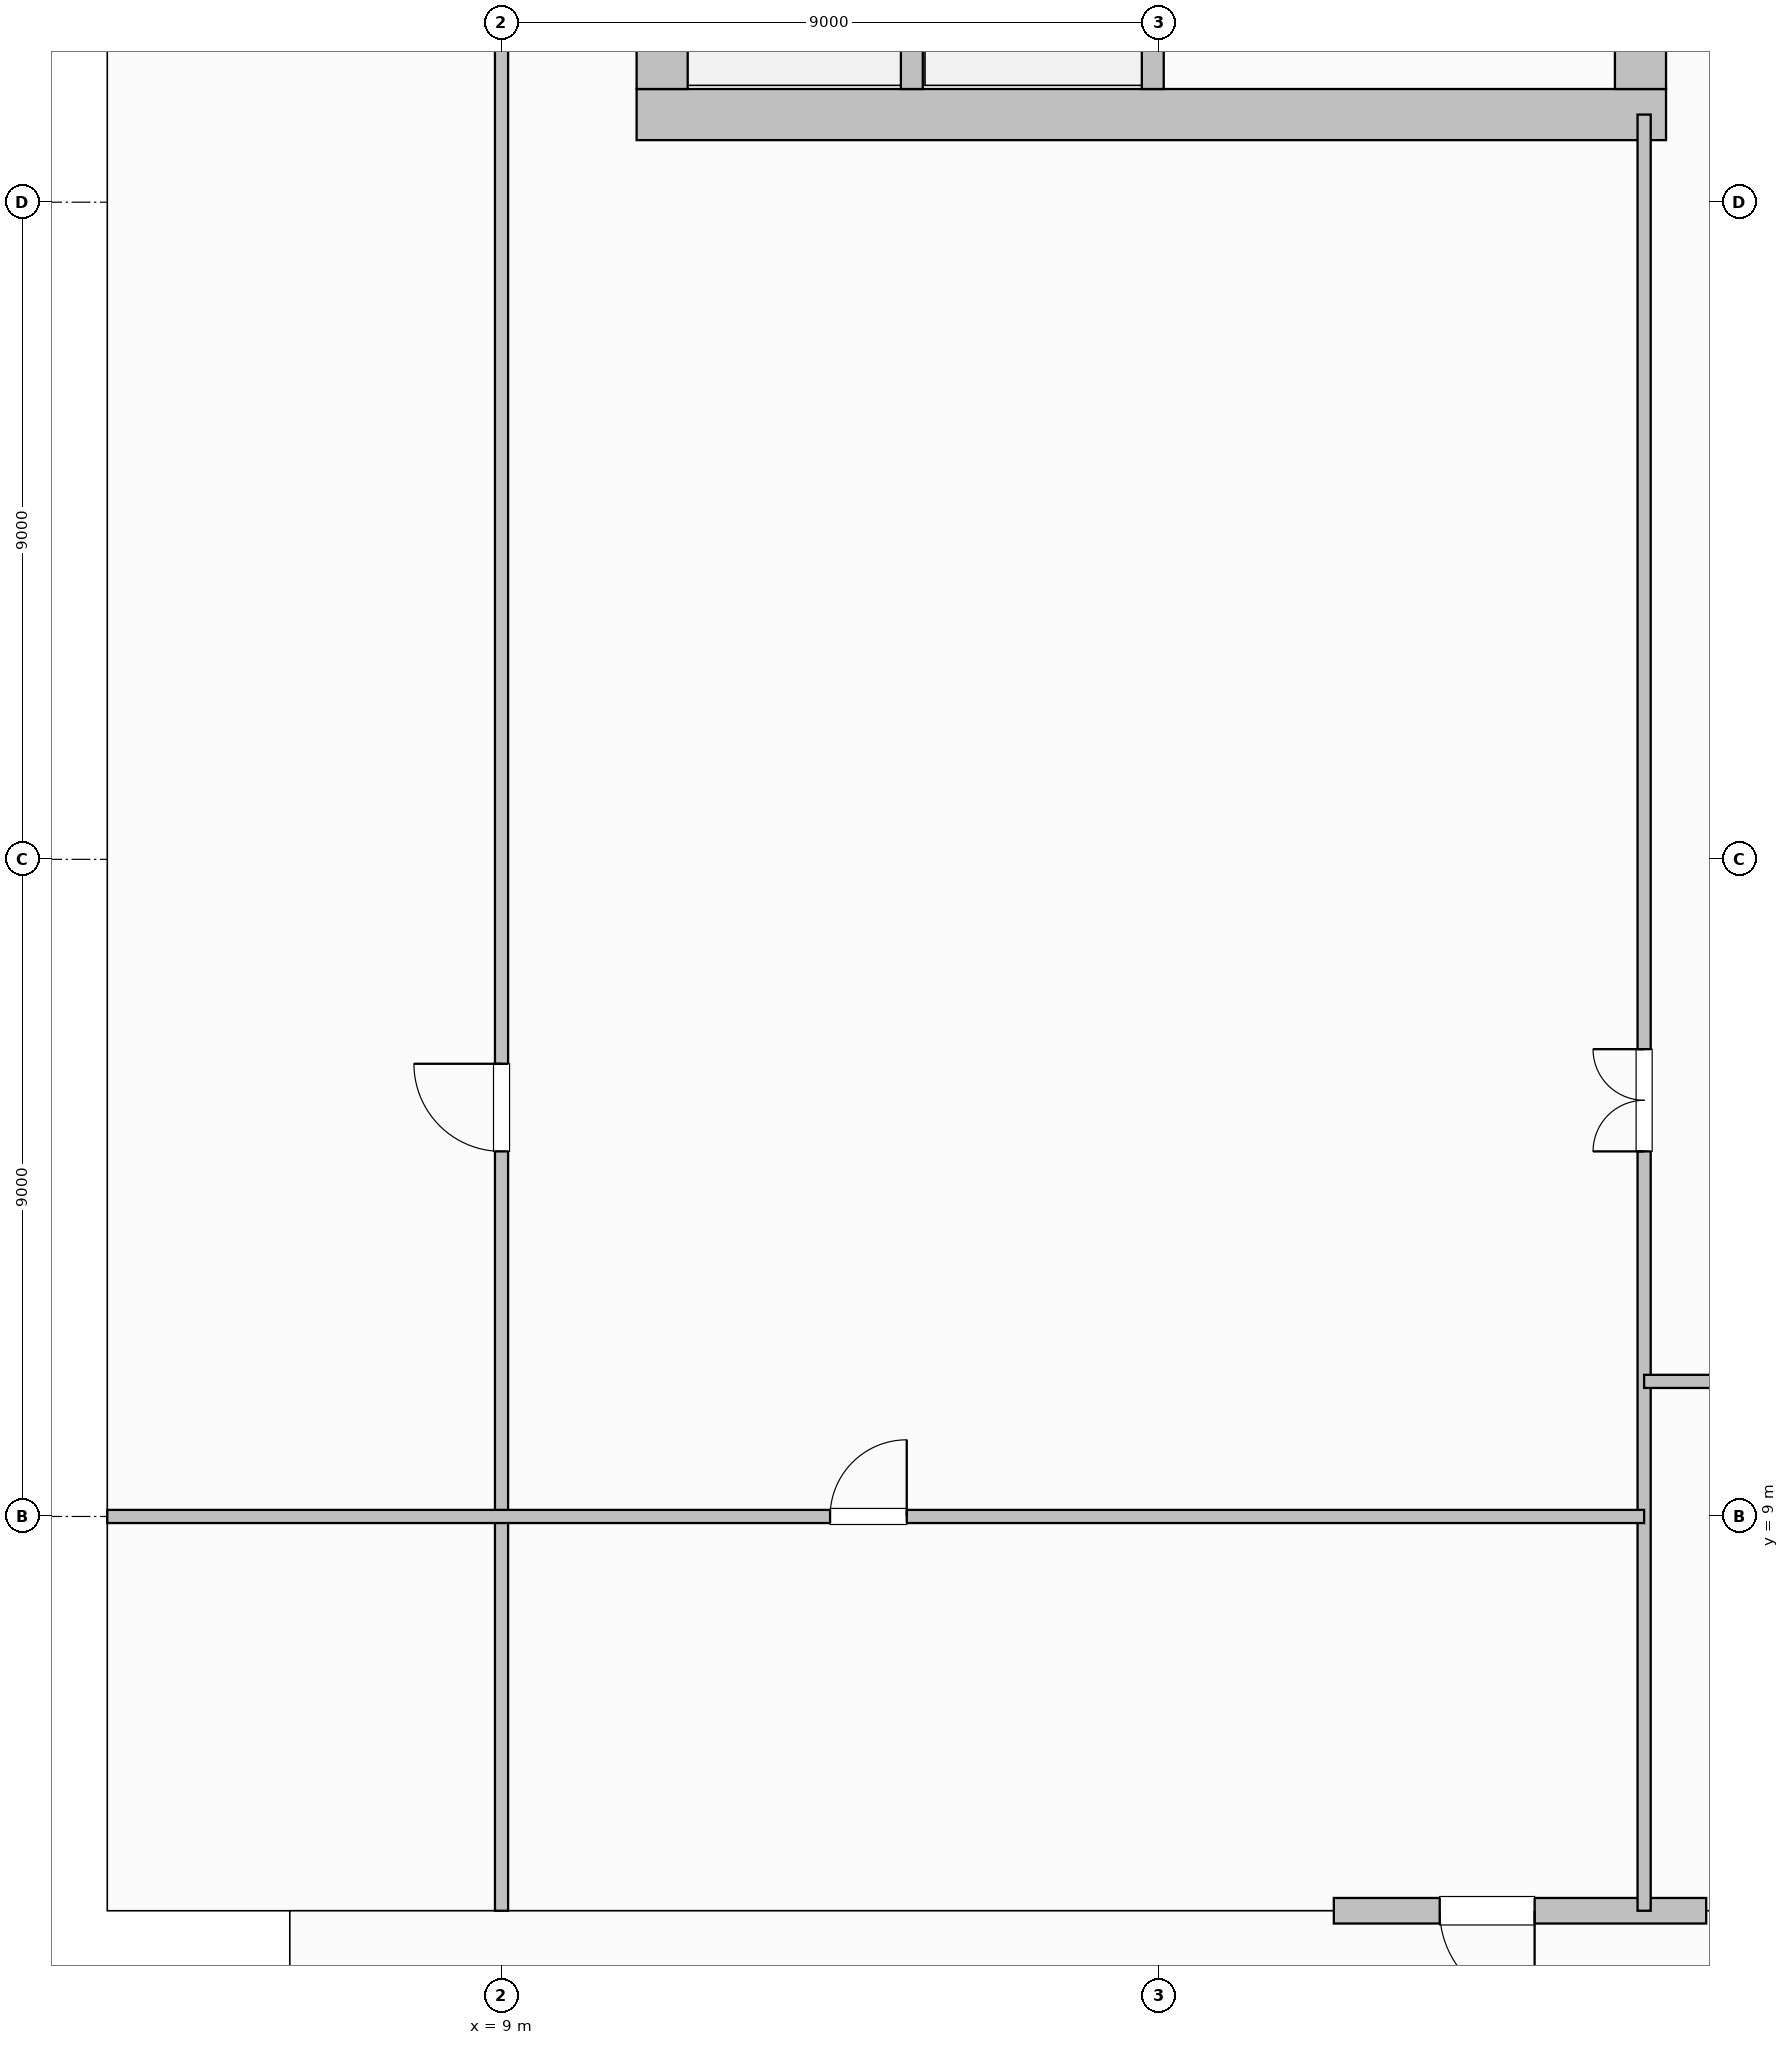
"""IFC4 building model, lengths in metres.
Left out: names, types, materials, properties, quantities, classifications, styles, units other than length and angle.
Written with IfcOpenShell. Run it as: python <this file> out.ifc"""

import sys

from ifc_helpers import new_model, si_unit, direction, frame, frame_2d, origin, origin_2d, place, context, subcontext, project, spatial, rectangle, i_section, extrude, element, fill, save


model = new_model("IFC4")
c1 = context("Model", 3, precision=1e-05, world=origin(), true_north=direction((0.0, 1.0)))
c2 = subcontext(c1, "Body", "Model", "MODEL_VIEW")
j1 = project(units=[si_unit("LENGTHUNIT", "METRE"), si_unit("PLANEANGLEUNIT", "RADIAN")], contexts=[c1])
p1 = place(None, origin())
s1 = spatial("IfcSite", under=j1, at=p1, CompositionType="ELEMENT")
p2 = place(p1, origin())
s2 = spatial("IfcBuilding", under=s1, at=p2, CompositionType="ELEMENT")
p3 = place(p2, frame((0.0, 0.0, 11.0)))
s3 = spatial("IfcBuildingStorey", under=s2, at=p3, CompositionType="ELEMENT", Elevation=11.0)
for number, where, z_axis, x_axis in (
    (1, (9.0, 9.0, 0.0), (0.0, 0.0, 1.0), (1.0, 0.0, 0.0)),
    (2, (9.0, 18.0, 0.0), (0.0, 0.0, 1.0), (1.0, 0.0, 0.0)),
    (3, (9.0, 27.0, 0.0), (0.0, 0.0, 1.0), (1.0, 0.0, 0.0)),
    (4, (18.0, 9.0, 0.0), (0.0, 0.0, 1.0), (1.0, 0.0, 0.0)),
    (5, (18.0, 27.0, 0.0), (0.0, 0.0, 1.0), (1.0, 0.0, 0.0)),
    (6, (9.0, 4.5, 0.0), (0.0, 0.0, 1.0), (1.0, 0.0, 0.0)),
    (7, (18.0, 4.5, 0.0), (0.0, 0.0, 1.0), (1.0, 0.0, 0.0)),
):
    element("IfcColumn", number, at=place(p3, frame(where, z_axis=z_axis, x_axis=x_axis)), inside=s3, PredefinedType="COLUMN", context=c2, shape_type="SweptSolid", body=[
        extrude(i_section(OverallWidth=0.442, OverallDepth=0.531, WebThickness=0.066, FlangeThickness=0.106, FilletRadius=0.015, at=origin_2d()), origin(), (0.0, 0.0, 1.0), 5.2),
    ])
p4 = place(p3, frame((25.5, 3.6, 0.0), z_axis=(0.0, 0.0, 1.0), x_axis=(-1.0, 0.0, 0.0)))
e8 = element("IfcWall", 8, at=p4, inside=s3, PredefinedType="SOLIDWALL", context=c2, shape_type="SweptSolid", body=[
    extrude(rectangle(XDim=5.1, YDim=0.35, at=frame_2d((2.55, 0.0))), origin(), (0.0, 0.0, 1.0), 4.88),
])
p5 = place(p4, frame((2.35, 0.0, 0.0)))
e9 = element("IfcOpeningElement", 9, at=p5, cuts=e8, PredefinedType="OPENING", context=c2, shape_type="SweptSolid", body=[
    extrude(rectangle(XDim=1.3, YDim=2.2, at=frame_2d((0.65, 1.1))), frame((0.0, 0.185, 0.0), z_axis=(0.0, -1.0, 0.0), x_axis=(1.0, 0.0, 0.0)), (0.0, 0.0, 1.0), 0.37),
])
p6 = place(p3, frame((10.85, 28.2, 0.0), z_axis=(0.0, 0.0, 1.0), x_axis=(1.0, 0.0, 0.0)))
e10 = element("IfcWall", 10, at=p6, inside=s3, PredefinedType="SHEAR", context=c2, shape_type="SweptSolid", body=[
    extrude(rectangle(XDim=14.1, YDim=0.7, at=frame_2d((7.05, 0.0))), origin(), (0.0, 0.0, 1.0), 4.88),
])
p7 = place(p3, frame((11.2, 42.05, 0.0), z_axis=(0.0, 0.0, 1.0), x_axis=(0.0, -1.0, 0.0)))
e11 = element("IfcWall", 11, at=p7, inside=s3, PredefinedType="SHEAR", context=c2, shape_type="SweptSolid", body=[
    extrude(rectangle(XDim=13.5, YDim=0.7, at=frame_2d((6.75, 0.0))), origin(), (0.0, 0.0, 1.0), 4.88),
])
p8 = place(p3, frame((24.6, 28.55, 0.0), z_axis=(0.0, 0.0, 1.0), x_axis=(0.0, 1.0, 0.0)))
e12 = element("IfcWall", 12, at=p8, inside=s3, PredefinedType="SHEAR", context=c2, shape_type="SweptSolid", body=[
    extrude(rectangle(XDim=13.5, YDim=0.7, at=frame_2d((6.75, 0.0))), origin(), (0.0, 0.0, 1.0), 4.88),
])
p9 = place(p8, frame((3.25, 0.0, 0.0)))
e13 = element("IfcOpeningElement", 13, at=p9, cuts=e12, PredefinedType="OPENING", context=c2, shape_type="SweptSolid", body=[
    extrude(rectangle(XDim=1.5, YDim=2.2, at=frame_2d((0.75, 1.1))), frame((0.0, 0.36, 0.0), z_axis=(0.0, -1.0, 0.0), x_axis=(1.0, 0.0, 0.0)), (0.0, 0.0, 1.0), 0.72),
])
p10 = place(p8, frame((9.85, 0.0, 0.0)))
e14 = element("IfcOpeningElement", 14, at=p10, cuts=e12, PredefinedType="OPENING", context=c2, shape_type="SweptSolid", body=[
    extrude(rectangle(XDim=0.9, YDim=2.1, at=frame_2d((0.45, 1.05))), frame((0.0, 0.36, 0.0), z_axis=(0.0, -1.0, 0.0), x_axis=(1.0, 0.0, 0.0)), (0.0, 0.0, 1.0), 0.72),
])
p11 = place(p3, frame((14.62, 28.55, 0.0), z_axis=(0.0, 0.0, 1.0), x_axis=(0.0, 1.0, 0.0)))
e15 = element("IfcWall", 15, at=p11, inside=s3, PredefinedType="SHEAR", context=c2, shape_type="SweptSolid", body=[
    extrude(rectangle(XDim=8.9, YDim=0.3, at=frame_2d((4.45, 0.0))), origin(), (0.0, 0.0, 1.0), 4.88),
])
p12 = place(p3, frame((17.92, 42.05, 0.0), z_axis=(0.0, 0.0, 1.0), x_axis=(0.0, -1.0, 0.0)))
e16 = element("IfcWall", 16, at=p12, inside=s3, PredefinedType="SHEAR", context=c2, shape_type="SweptSolid", body=[
    extrude(rectangle(XDim=13.5, YDim=0.3, at=frame_2d((6.75, 0.0))), origin(), (0.0, 0.0, 1.0), 4.88),
])
p13 = place(p12, frame((1.875, 0.0, 0.0)))
e17 = element("IfcOpeningElement", 17, at=p13, cuts=e16, PredefinedType="OPENING", context=c2, shape_type="SweptSolid", body=[
    extrude(rectangle(XDim=1.15, YDim=2.15, at=frame_2d((0.575, 1.075))), frame((0.0, 0.16, 0.0), z_axis=(0.0, -1.0, 0.0), x_axis=(1.0, 0.0, 0.0)), (0.0, 0.0, 1.0), 0.32),
])
p14 = place(p3, frame((24.65, 3.6, 0.0), z_axis=(0.0, 0.0, 1.0), x_axis=(0.0, 1.0, 0.0)))
e18 = element("IfcWall", 18, at=p14, inside=s3, PredefinedType="PARTITIONING", context=c2, shape_type="SweptSolid", body=[
    extrude(rectangle(XDim=24.6, YDim=0.18, at=frame_2d((12.3, 0.0))), origin(), (0.0, 0.0, 1.0), 3.912),
])
p15 = place(p14, frame((10.4, 0.0, 0.0)))
e19 = element("IfcOpeningElement", 19, at=p15, cuts=e18, PredefinedType="OPENING", context=c2, shape_type="SweptSolid", body=[
    extrude(rectangle(XDim=1.4, YDim=2.15, at=frame_2d((0.7, 1.075))), frame((0.0, 0.1, 0.0), z_axis=(0.0, -1.0, 0.0), x_axis=(1.0, 0.0, 0.0)), (0.0, 0.0, 1.0), 0.2),
])
p16 = place(p3, frame((24.65, 10.85, 0.0), z_axis=(0.0, 0.0, 1.0), x_axis=(1.0, 0.0, 0.0)))
e20 = element("IfcWall", 20, at=p16, inside=s3, PredefinedType="PARTITIONING", context=c2, shape_type="SweptSolid", body=[
    extrude(rectangle(XDim=38.35, YDim=0.18, at=frame_2d((19.175, 0.0))), origin(), (0.0, 0.0, 1.0), 4.005),
])
p17 = place(p16, frame((2.0, 0.0, 0.0)))
e21 = element("IfcOpeningElement", 21, at=p17, cuts=e20, PredefinedType="OPENING", context=c2, shape_type="SweptSolid", body=[
    extrude(rectangle(XDim=1.2, YDim=2.15, at=frame_2d((0.6, 1.075))), frame((0.0, 0.1, 0.0), z_axis=(0.0, -1.0, 0.0), x_axis=(1.0, 0.0, 0.0)), (0.0, 0.0, 1.0), 0.2),
])
p18 = place(p3, frame((9.0, 3.6, 0.0), z_axis=(0.0, 0.0, 1.0), x_axis=(0.0, 1.0, 0.0)))
e22 = element("IfcWall", 22, at=p18, inside=s3, PredefinedType="PARTITIONING", context=c2, shape_type="SweptSolid", body=[
    extrude(rectangle(XDim=50.4, YDim=0.18, at=frame_2d((25.2, 0.0))), origin(), (0.0, 0.0, 1.0), 3.912),
])
p19 = place(p18, frame((10.4, 0.0, 0.0)))
e23 = element("IfcOpeningElement", 23, at=p19, cuts=e22, PredefinedType="OPENING", context=c2, shape_type="SweptSolid", body=[
    extrude(rectangle(XDim=1.2, YDim=2.15, at=frame_2d((0.6, 1.075))), frame((0.0, 0.1, 0.0), z_axis=(0.0, -1.0, 0.0), x_axis=(1.0, 0.0, 0.0)), (0.0, 0.0, 1.0), 0.2),
])
p20 = place(p3, frame((3.6, 9.0, 0.0), z_axis=(0.0, 0.0, 1.0), x_axis=(1.0, 0.0, 0.0)))
e24 = element("IfcWall", 24, at=p20, inside=s3, PredefinedType="PARTITIONING", context=c2, shape_type="SweptSolid", body=[
    extrude(rectangle(XDim=21.05, YDim=0.18, at=frame_2d((10.525, 0.0))), origin(), (0.0, 0.0, 1.0), 3.933),
])
p21 = place(p20, frame((9.9, 0.0, 0.0)))
e25 = element("IfcOpeningElement", 25, at=p21, cuts=e24, PredefinedType="OPENING", context=c2, shape_type="SweptSolid", body=[
    extrude(rectangle(XDim=1.05, YDim=2.15, at=frame_2d((0.525, 1.075))), frame((0.0, 0.1, 0.0), z_axis=(0.0, -1.0, 0.0), x_axis=(1.0, 0.0, 0.0)), (0.0, 0.0, 1.0), 0.2),
])
p22 = place(p5, origin())
e26 = element("IfcDoor", 26, at=p22, inside=s3, OperationType="SINGLE_SWING_LEFT", PredefinedType="DOOR", context=c2, shape_type="SweptSolid", body=[
    extrude(rectangle(XDim=1.3, YDim=2.2, at=frame_2d((0.65, 1.1))), frame((0.0, 0.025, 0.0), z_axis=(0.0, -1.0, 0.0), x_axis=(1.0, 0.0, 0.0)), (0.0, 0.0, 1.0), 0.05),
])
fill(e9, e26)
p23 = place(p15, origin())
e27 = element("IfcDoor", 27, at=p23, inside=s3, OperationType="DOUBLE_DOOR_SINGLE_SWING", PredefinedType="DOOR", context=c2, shape_type="SweptSolid", body=[
    extrude(rectangle(XDim=1.4, YDim=2.15, at=frame_2d((0.7, 1.075))), frame((0.0, 0.025, 0.0), z_axis=(0.0, -1.0, 0.0), x_axis=(1.0, 0.0, 0.0)), (0.0, 0.0, 1.0), 0.05),
])
fill(e19, e27)
p24 = place(p19, origin())
e28 = element("IfcDoor", 28, at=p24, inside=s3, OperationType="SINGLE_SWING_RIGHT", PredefinedType="DOOR", context=c2, shape_type="SweptSolid", body=[
    extrude(rectangle(XDim=1.2, YDim=2.15, at=frame_2d((0.6, 1.075))), frame((0.0, 0.025, 0.0), z_axis=(0.0, -1.0, 0.0), x_axis=(1.0, 0.0, 0.0)), (0.0, 0.0, 1.0), 0.05),
])
fill(e23, e28)
p25 = place(p21, origin())
e29 = element("IfcDoor", 29, at=p25, inside=s3, OperationType="SINGLE_SWING_RIGHT", PredefinedType="DOOR", context=c2, shape_type="SweptSolid", body=[
    extrude(rectangle(XDim=1.05, YDim=2.15, at=frame_2d((0.525, 1.075))), frame((0.0, 0.025, 0.0), z_axis=(0.0, -1.0, 0.0), x_axis=(1.0, 0.0, 0.0)), (0.0, 0.0, 1.0), 0.05),
])
fill(e25, e29)
save(model, sys.argv[1])
